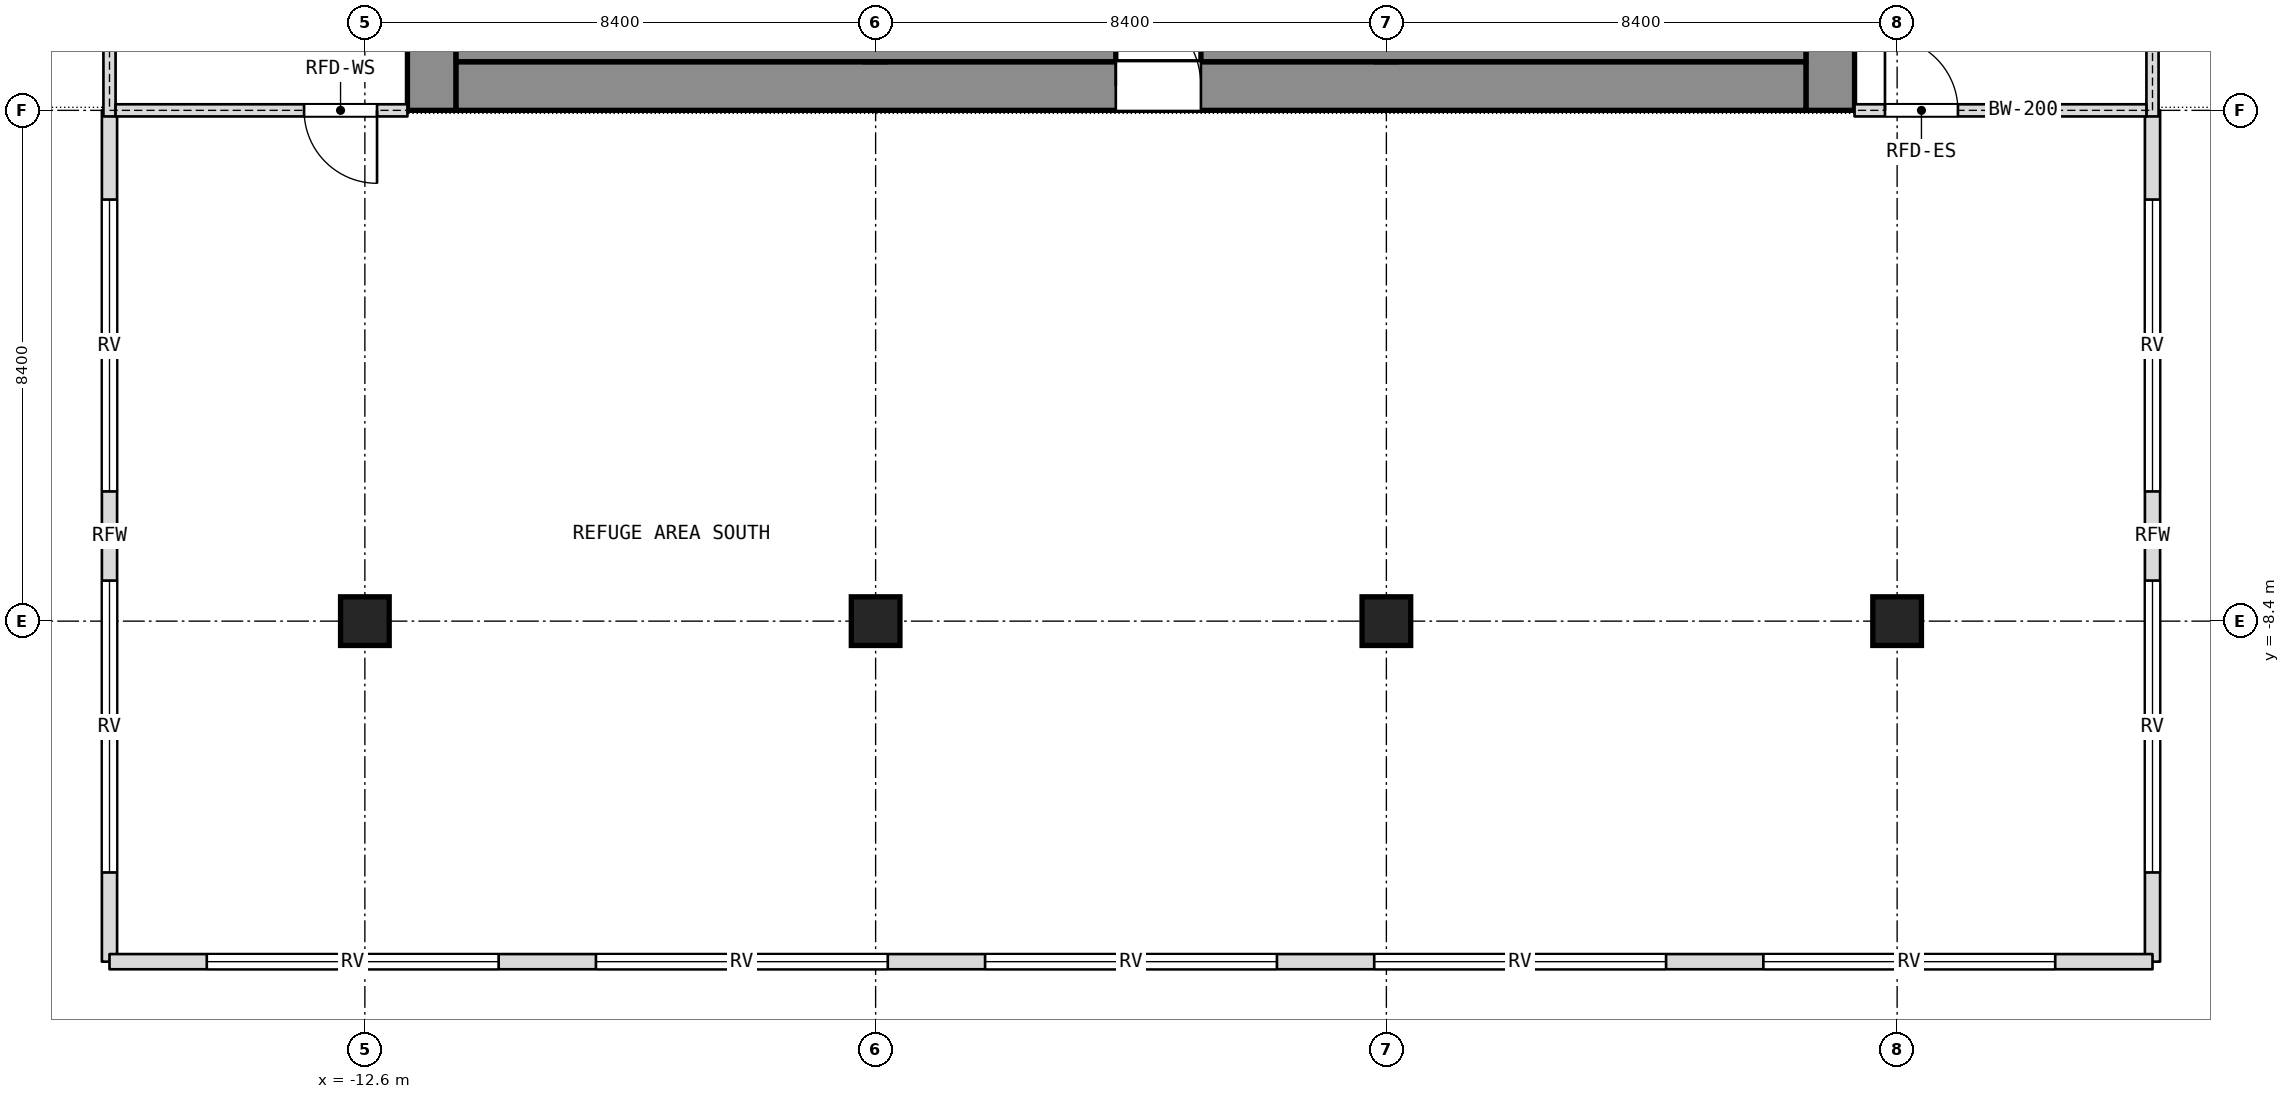
"""IFC4 building model, lengths in metres.
Left out: names, types, materials, properties, quantities, classifications, styles, units other than length and angle.
Written with IfcOpenShell. Run it as: python <this file> out.ifc"""

import sys

from ifc_helpers import new_model, si_unit, direction, frame, frame_2d, origin, origin_2d, place, context, subcontext, project, spatial, rectangle, extrude, element, fill, save


model = new_model("IFC4")
c1 = context("Model", 3, precision=1e-05, world=origin(), true_north=direction((0.0, 1.0)))
c2 = subcontext(c1, "Body", "Model", "MODEL_VIEW")
j1 = project(units=[si_unit("LENGTHUNIT", "METRE"), si_unit("PLANEANGLEUNIT", "RADIAN")], contexts=[c1])
p1 = place(None, origin())
s1 = spatial("IfcSite", under=j1, at=p1, CompositionType="ELEMENT")
p2 = place(p1, origin())
s2 = spatial("IfcBuilding", under=s1, at=p2, CompositionType="ELEMENT")
p3 = place(p2, frame((0.0, 0.0, 252.5)))
s3 = spatial("IfcBuildingStorey", under=s2, at=p3, CompositionType="ELEMENT", Elevation=252.5)
p4 = place(p3, frame((11.5, 0.0, 0.0), z_axis=(0.0, 0.0, 1.0), x_axis=(0.0, 1.0, 0.0)))
e1 = element("IfcWall", 1, at=p4, inside=s3, PredefinedType="SHEAR", context=c2, shape_type="SweptSolid", body=[
    extrude(rectangle(XDim=16.8, YDim=0.8, at=frame_2d((8.4, 0.0))), origin(), (0.0, 0.0, 1.0), 14.4),
])
p5 = place(p4, frame((6.825, 0.0, 0.0)))
e2 = element("IfcOpeningElement", 2, at=p5, cuts=e1, PredefinedType="OPENING", context=c2, shape_type="SweptSolid", body=[
    extrude(rectangle(XDim=1.2, YDim=2.1, at=frame_2d((0.6, 1.05))), frame((0.0, 0.4, 0.0), z_axis=(0.0, -1.0, 0.0), x_axis=(1.0, 0.0, 0.0)), (0.0, 0.0, 1.0), 0.8),
])
p6 = place(p4, frame((8.775, 0.0, 0.0)))
e3 = element("IfcOpeningElement", 3, at=p6, cuts=e1, PredefinedType="OPENING", context=c2, shape_type="SweptSolid", body=[
    extrude(rectangle(XDim=1.2, YDim=2.1, at=frame_2d((0.6, 1.05))), frame((0.0, 0.4, 0.0), z_axis=(0.0, -1.0, 0.0), x_axis=(1.0, 0.0, 0.0)), (0.0, 0.0, 1.0), 0.8),
])
p7 = place(p3, frame((-11.5, 0.0, 0.0), z_axis=(0.0, 0.0, 1.0), x_axis=(0.0, 1.0, 0.0)))
e4 = element("IfcWall", 4, at=p7, inside=s3, PredefinedType="SHEAR", context=c2, shape_type="SweptSolid", body=[
    extrude(rectangle(XDim=16.8, YDim=0.8, at=frame_2d((8.4, 0.0))), origin(), (0.0, 0.0, 1.0), 14.4),
])
p8 = place(p7, frame((3.6, 0.0, 0.0)))
e5 = element("IfcOpeningElement", 5, at=p8, cuts=e4, PredefinedType="OPENING", context=c2, shape_type="SweptSolid", body=[
    extrude(rectangle(XDim=0.9, YDim=2.1, at=frame_2d((0.45, 1.05))), frame((0.0, 0.4, 0.0), z_axis=(0.0, -1.0, 0.0), x_axis=(1.0, 0.0, 0.0)), (0.0, 0.0, 1.0), 0.8),
])
p9 = place(p7, frame((6.825, 0.0, 0.0)))
e6 = element("IfcOpeningElement", 6, at=p9, cuts=e4, PredefinedType="OPENING", context=c2, shape_type="SweptSolid", body=[
    extrude(rectangle(XDim=1.2, YDim=2.1, at=frame_2d((0.6, 1.05))), frame((0.0, 0.4, 0.0), z_axis=(0.0, -1.0, 0.0), x_axis=(1.0, 0.0, 0.0)), (0.0, 0.0, 1.0), 0.8),
])
p10 = place(p7, frame((12.3, 0.0, 0.0)))
e7 = element("IfcOpeningElement", 7, at=p10, cuts=e4, PredefinedType="OPENING", context=c2, shape_type="SweptSolid", body=[
    extrude(rectangle(XDim=0.9, YDim=2.1, at=frame_2d((0.45, 1.05))), frame((0.0, 0.4, 0.0), z_axis=(0.0, -1.0, 0.0), x_axis=(1.0, 0.0, 0.0)), (0.0, 0.0, 1.0), 0.8),
])
p11 = place(p7, frame((8.775, 0.0, 0.0)))
e8 = element("IfcOpeningElement", 8, at=p11, cuts=e4, PredefinedType="OPENING", context=c2, shape_type="SweptSolid", body=[
    extrude(rectangle(XDim=1.2, YDim=2.1, at=frame_2d((0.6, 1.05))), frame((0.0, 0.4, 0.0), z_axis=(0.0, -1.0, 0.0), x_axis=(1.0, 0.0, 0.0)), (0.0, 0.0, 1.0), 0.8),
])
p12 = place(p3, frame((-11.1, 0.4, 0.0), z_axis=(0.0, 0.0, 1.0), x_axis=(1.0, 0.0, 0.0)))
e9 = element("IfcWall", 9, at=p12, inside=s3, PredefinedType="SHEAR", context=c2, shape_type="SweptSolid", body=[
    extrude(rectangle(XDim=22.2, YDim=0.8, at=frame_2d((11.1, 0.0))), origin(), (0.0, 0.0, 1.0), 14.4),
])
p13 = place(p12, frame((10.85, 0.0, 0.0)))
e10 = element("IfcOpeningElement", 10, at=p13, cuts=e9, PredefinedType="OPENING", context=c2, shape_type="SweptSolid", body=[
    extrude(rectangle(XDim=1.4, YDim=2.1, at=frame_2d((0.7, 1.05))), frame((0.0, 0.4, 0.0), z_axis=(0.0, -1.0, 0.0), x_axis=(1.0, 0.0, 0.0)), (0.0, 0.0, 1.0), 0.8),
])
p14 = place(p3, frame((-4.2, 0.8, 0.0), z_axis=(0.0, 0.0, 1.0), x_axis=(0.0, 1.0, 0.0)))
e11 = element("IfcWall", 11, at=p14, inside=s3, PredefinedType="SHEAR", context=c2, shape_type="SweptSolid", body=[
    extrude(rectangle(XDim=15.2, YDim=0.4, at=frame_2d((7.6, 0.0))), origin(), (0.0, 0.0, 1.0), 14.4),
])
p15 = place(p14, frame((8.5, 0.0, 0.0)))
e12 = element("IfcOpeningElement", 12, at=p15, cuts=e11, PredefinedType="OPENING", context=c2, shape_type="SweptSolid", body=[
    extrude(rectangle(XDim=1.2, YDim=2.1, at=frame_2d((0.6, 1.05))), frame((0.0, 0.2, 0.0), z_axis=(0.0, -1.0, 0.0), x_axis=(1.0, 0.0, 0.0)), (0.0, 0.0, 1.0), 0.4),
])
p16 = place(p3, frame((4.2, 0.8, 0.0), z_axis=(0.0, 0.0, 1.0), x_axis=(0.0, 1.0, 0.0)))
e13 = element("IfcWall", 13, at=p16, inside=s3, PredefinedType="SHEAR", context=c2, shape_type="SweptSolid", body=[
    extrude(rectangle(XDim=15.2, YDim=0.4, at=frame_2d((7.6, 0.0))), origin(), (0.0, 0.0, 1.0), 14.4),
])
p17 = place(p16, frame((5.95, 0.0, 0.0)))
e14 = element("IfcOpeningElement", 14, at=p17, cuts=e13, PredefinedType="OPENING", context=c2, shape_type="SweptSolid", body=[
    extrude(rectangle(XDim=1.2, YDim=2.1, at=frame_2d((0.6, 1.05))), frame((0.0, 0.2, 0.0), z_axis=(0.0, -1.0, 0.0), x_axis=(1.0, 0.0, 0.0)), (0.0, 0.0, 1.0), 0.4),
])
for number, where, z_axis, x_axis in (
    (15, (-12.6, -8.4, 0.0), (0.0, 0.0, 1.0), (1.0, 0.0, 0.0)),
    (16, (-4.2, -8.4, 0.0), (0.0, 0.0, 1.0), (1.0, 0.0, 0.0)),
    (17, (4.2, -8.4, 0.0), (0.0, 0.0, 1.0), (1.0, 0.0, 0.0)),
    (18, (12.6, -8.4, 0.0), (0.0, 0.0, 1.0), (1.0, 0.0, 0.0)),
):
    element("IfcColumn", number, at=place(p3, frame(where, z_axis=z_axis, x_axis=x_axis)), inside=s3, PredefinedType="COLUMN", context=c2, shape_type="SweptSolid", body=[
        extrude(rectangle(XDim=0.8, YDim=0.8, at=origin_2d()), origin(), (0.0, 0.0, 1.0), 14.4),
    ])
p18 = place(p3, frame((-16.8, -14.0, 0.0), z_axis=(0.0, 0.0, 1.0), x_axis=(0.0, 1.0, 0.0)))
e19 = element("IfcWall", 19, at=p18, inside=s3, PredefinedType="SOLIDWALL", context=c2, shape_type="SweptSolid", body=[
    extrude(rectangle(XDim=14.0, YDim=0.25, at=frame_2d((7.0, 0.0))), origin(), (0.0, 0.0, 1.0), 14.14),
])
p19 = place(p18, frame((1.467, 0.0, 1.0)))
e20 = element("IfcOpeningElement", 20, at=p19, cuts=e19, PredefinedType="OPENING", context=c2, shape_type="SweptSolid", body=[
    extrude(rectangle(XDim=4.8, YDim=3.0, at=frame_2d((2.4, 1.5))), frame((0.0, 0.125, 0.0), z_axis=(0.0, -1.0, 0.0), x_axis=(1.0, 0.0, 0.0)), (0.0, 0.0, 1.0), 0.25),
])
p20 = place(p18, frame((7.733, 0.0, 1.0)))
e21 = element("IfcOpeningElement", 21, at=p20, cuts=e19, PredefinedType="OPENING", context=c2, shape_type="SweptSolid", body=[
    extrude(rectangle(XDim=4.8, YDim=3.0, at=frame_2d((2.4, 1.5))), frame((0.0, 0.125, 0.0), z_axis=(0.0, -1.0, 0.0), x_axis=(1.0, 0.0, 0.0)), (0.0, 0.0, 1.0), 0.25),
])
p21 = place(p3, frame((16.8, 0.0, 0.0), z_axis=(0.0, 0.0, 1.0), x_axis=(0.0, -1.0, 0.0)))
e22 = element("IfcWall", 22, at=p21, inside=s3, PredefinedType="SOLIDWALL", context=c2, shape_type="SweptSolid", body=[
    extrude(rectangle(XDim=14.0, YDim=0.25, at=frame_2d((7.0, 0.0))), origin(), (0.0, 0.0, 1.0), 14.14),
])
p22 = place(p21, frame((1.467, 0.0, 1.0)))
e23 = element("IfcOpeningElement", 23, at=p22, cuts=e22, PredefinedType="OPENING", context=c2, shape_type="SweptSolid", body=[
    extrude(rectangle(XDim=4.8, YDim=3.0, at=frame_2d((2.4, 1.5))), frame((0.0, 0.125, 0.0), z_axis=(0.0, -1.0, 0.0), x_axis=(1.0, 0.0, 0.0)), (0.0, 0.0, 1.0), 0.25),
])
p23 = place(p21, frame((7.733, 0.0, 1.0)))
e24 = element("IfcOpeningElement", 24, at=p23, cuts=e22, PredefinedType="OPENING", context=c2, shape_type="SweptSolid", body=[
    extrude(rectangle(XDim=4.8, YDim=3.0, at=frame_2d((2.4, 1.5))), frame((0.0, 0.125, 0.0), z_axis=(0.0, -1.0, 0.0), x_axis=(1.0, 0.0, 0.0)), (0.0, 0.0, 1.0), 0.25),
])
p24 = place(p3, frame((16.8, -14.0, 0.0), z_axis=(0.0, 0.0, 1.0), x_axis=(-1.0, 0.0, 0.0)))
e25 = element("IfcWall", 25, at=p24, inside=s3, PredefinedType="SOLIDWALL", context=c2, shape_type="SweptSolid", body=[
    extrude(rectangle(XDim=33.6, YDim=0.25, at=frame_2d((16.8, 0.0))), origin(), (0.0, 0.0, 1.0), 14.14),
])
p25 = place(p24, frame((1.6, 0.0, 1.0)))
e26 = element("IfcOpeningElement", 26, at=p25, cuts=e25, PredefinedType="OPENING", context=c2, shape_type="SweptSolid", body=[
    extrude(rectangle(XDim=4.8, YDim=3.0, at=frame_2d((2.4, 1.5))), frame((0.0, 0.125, 0.0), z_axis=(0.0, -1.0, 0.0), x_axis=(1.0, 0.0, 0.0)), (0.0, 0.0, 1.0), 0.25),
])
p26 = place(p24, frame((8.0, 0.0, 1.0)))
e27 = element("IfcOpeningElement", 27, at=p26, cuts=e25, PredefinedType="OPENING", context=c2, shape_type="SweptSolid", body=[
    extrude(rectangle(XDim=4.8, YDim=3.0, at=frame_2d((2.4, 1.5))), frame((0.0, 0.125, 0.0), z_axis=(0.0, -1.0, 0.0), x_axis=(1.0, 0.0, 0.0)), (0.0, 0.0, 1.0), 0.25),
])
p27 = place(p24, frame((14.4, 0.0, 1.0)))
e28 = element("IfcOpeningElement", 28, at=p27, cuts=e25, PredefinedType="OPENING", context=c2, shape_type="SweptSolid", body=[
    extrude(rectangle(XDim=4.8, YDim=3.0, at=frame_2d((2.4, 1.5))), frame((0.0, 0.125, 0.0), z_axis=(0.0, -1.0, 0.0), x_axis=(1.0, 0.0, 0.0)), (0.0, 0.0, 1.0), 0.25),
])
p28 = place(p24, frame((20.8, 0.0, 1.0)))
e29 = element("IfcOpeningElement", 29, at=p28, cuts=e25, PredefinedType="OPENING", context=c2, shape_type="SweptSolid", body=[
    extrude(rectangle(XDim=4.8, YDim=3.0, at=frame_2d((2.4, 1.5))), frame((0.0, 0.125, 0.0), z_axis=(0.0, -1.0, 0.0), x_axis=(1.0, 0.0, 0.0)), (0.0, 0.0, 1.0), 0.25),
])
p29 = place(p24, frame((27.2, 0.0, 1.0)))
e30 = element("IfcOpeningElement", 30, at=p29, cuts=e25, PredefinedType="OPENING", context=c2, shape_type="SweptSolid", body=[
    extrude(rectangle(XDim=4.8, YDim=3.0, at=frame_2d((2.4, 1.5))), frame((0.0, 0.125, 0.0), z_axis=(0.0, -1.0, 0.0), x_axis=(1.0, 0.0, 0.0)), (0.0, 0.0, 1.0), 0.25),
])
p30 = place(p3, frame((-11.1, 1.15, 0.0), z_axis=(0.0, 0.0, 1.0), x_axis=(1.0, 0.0, 0.0)))
e31 = element("IfcWall", 31, at=p30, inside=s3, PredefinedType="PARTITIONING", context=c2, shape_type="SweptSolid", body=[
    extrude(rectangle(XDim=10.85, YDim=0.7, at=frame_2d((5.425, 0.0))), origin(), (0.0, 0.0, 1.0), 14.14),
])
p31 = place(p3, frame((1.15, 1.15, 0.0), z_axis=(0.0, 0.0, 1.0), x_axis=(1.0, 0.0, 0.0)))
e32 = element("IfcWall", 32, at=p31, inside=s3, PredefinedType="PARTITIONING", context=c2, shape_type="SweptSolid", body=[
    extrude(rectangle(XDim=9.95, YDim=0.7, at=frame_2d((4.975, 0.0))), origin(), (0.0, 0.0, 1.0), 14.14),
])
p32 = place(p3, frame((-16.8, -0.1, 0.0), z_axis=(0.0, 0.0, 1.0), x_axis=(0.0, 1.0, 0.0)))
e33 = element("IfcWall", 33, at=p32, inside=s3, PredefinedType="PARTITIONING", context=c2, shape_type="SweptSolid", body=[
    extrude(rectangle(XDim=17.0, YDim=0.2, at=frame_2d((8.5, 0.0))), origin(), (0.0, 0.0, 1.0), 13.74),
])
p33 = place(p32, frame((2.2, 0.0, 0.0)))
e34 = element("IfcOpeningElement", 34, at=p33, cuts=e33, PredefinedType="OPENING", context=c2, shape_type="SweptSolid", body=[
    extrude(rectangle(XDim=1.8, YDim=2.1, at=frame_2d((0.9, 1.05))), frame((0.0, 0.1, 0.0), z_axis=(0.0, -1.0, 0.0), x_axis=(1.0, 0.0, 0.0)), (0.0, 0.0, 1.0), 0.2),
])
p34 = place(p32, frame((13.0, 0.0, 0.0)))
e35 = element("IfcOpeningElement", 35, at=p34, cuts=e33, PredefinedType="OPENING", context=c2, shape_type="SweptSolid", body=[
    extrude(rectangle(XDim=1.8, YDim=2.1, at=frame_2d((0.9, 1.05))), frame((0.0, 0.1, 0.0), z_axis=(0.0, -1.0, 0.0), x_axis=(1.0, 0.0, 0.0)), (0.0, 0.0, 1.0), 0.2),
])
p35 = place(p3, frame((-16.7, 0.0, 0.0), z_axis=(0.0, 0.0, 1.0), x_axis=(1.0, 0.0, 0.0)))
e36 = element("IfcWall", 36, at=p35, inside=s3, PredefinedType="PARTITIONING", context=c2, shape_type="SweptSolid", body=[
    extrude(rectangle(XDim=4.8, YDim=0.2, at=frame_2d((2.4, 0.0))), origin(), (0.0, 0.0, 1.0), 13.8),
])
p36 = place(p35, frame((3.1, 0.0, 0.0)))
e37 = element("IfcOpeningElement", 37, at=p36, cuts=e36, PredefinedType="OPENING", context=c2, shape_type="SweptSolid", body=[
    extrude(rectangle(XDim=1.2, YDim=2.1, at=frame_2d((0.6, 1.05))), frame((0.0, 0.1, 0.0), z_axis=(0.0, -1.0, 0.0), x_axis=(1.0, 0.0, 0.0)), (0.0, 0.0, 1.0), 0.2),
])
p37 = place(p3, frame((16.8, -0.1, 0.0), z_axis=(0.0, 0.0, 1.0), x_axis=(0.0, 1.0, 0.0)))
e38 = element("IfcWall", 38, at=p37, inside=s3, PredefinedType="PARTITIONING", context=c2, shape_type="SweptSolid", body=[
    extrude(rectangle(XDim=17.0, YDim=0.2, at=frame_2d((8.5, 0.0))), origin(), (0.0, 0.0, 1.0), 13.74),
])
p38 = place(p37, frame((2.2, 0.0, 0.0)))
e39 = element("IfcOpeningElement", 39, at=p38, cuts=e38, PredefinedType="OPENING", context=c2, shape_type="SweptSolid", body=[
    extrude(rectangle(XDim=1.8, YDim=2.1, at=frame_2d((0.9, 1.05))), frame((0.0, 0.1, 0.0), z_axis=(0.0, -1.0, 0.0), x_axis=(1.0, 0.0, 0.0)), (0.0, 0.0, 1.0), 0.2),
])
p39 = place(p37, frame((13.0, 0.0, 0.0)))
e40 = element("IfcOpeningElement", 40, at=p39, cuts=e38, PredefinedType="OPENING", context=c2, shape_type="SweptSolid", body=[
    extrude(rectangle(XDim=1.8, YDim=2.1, at=frame_2d((0.9, 1.05))), frame((0.0, 0.1, 0.0), z_axis=(0.0, -1.0, 0.0), x_axis=(1.0, 0.0, 0.0)), (0.0, 0.0, 1.0), 0.2),
])
p40 = place(p3, frame((11.9, 0.0, 0.0), z_axis=(0.0, 0.0, 1.0), x_axis=(1.0, 0.0, 0.0)))
e41 = element("IfcWall", 41, at=p40, inside=s3, PredefinedType="PARTITIONING", context=c2, shape_type="SweptSolid", body=[
    extrude(rectangle(XDim=4.8, YDim=0.2, at=frame_2d((2.4, 0.0))), origin(), (0.0, 0.0, 1.0), 13.8),
])
p41 = place(p40, frame((0.5, 0.0, 0.0)))
e42 = element("IfcOpeningElement", 42, at=p41, cuts=e41, PredefinedType="OPENING", context=c2, shape_type="SweptSolid", body=[
    extrude(rectangle(XDim=1.2, YDim=2.1, at=frame_2d((0.6, 1.05))), frame((0.0, 0.1, 0.0), z_axis=(0.0, -1.0, 0.0), x_axis=(1.0, 0.0, 0.0)), (0.0, 0.0, 1.0), 0.2),
])
p42 = place(p19, origin())
e43 = element("IfcWindow", 43, at=p42, inside=s3, PartitioningType="SINGLE_PANEL", PredefinedType="WINDOW", context=c2, shape_type="SweptSolid", body=[
    extrude(rectangle(XDim=4.8, YDim=3.0, at=frame_2d((2.4, 1.5))), frame((0.0, 0.03, 0.0), z_axis=(0.0, -1.0, 0.0), x_axis=(1.0, 0.0, 0.0)), (0.0, 0.0, 1.0), 0.06),
])
fill(e20, e43)
p43 = place(p20, origin())
e44 = element("IfcWindow", 44, at=p43, inside=s3, PartitioningType="SINGLE_PANEL", PredefinedType="WINDOW", context=c2, shape_type="SweptSolid", body=[
    extrude(rectangle(XDim=4.8, YDim=3.0, at=frame_2d((2.4, 1.5))), frame((0.0, 0.03, 0.0), z_axis=(0.0, -1.0, 0.0), x_axis=(1.0, 0.0, 0.0)), (0.0, 0.0, 1.0), 0.06),
])
fill(e21, e44)
p44 = place(p22, origin())
e45 = element("IfcWindow", 45, at=p44, inside=s3, PartitioningType="SINGLE_PANEL", PredefinedType="WINDOW", context=c2, shape_type="SweptSolid", body=[
    extrude(rectangle(XDim=4.8, YDim=3.0, at=frame_2d((2.4, 1.5))), frame((0.0, 0.03, 0.0), z_axis=(0.0, -1.0, 0.0), x_axis=(1.0, 0.0, 0.0)), (0.0, 0.0, 1.0), 0.06),
])
fill(e23, e45)
p45 = place(p23, origin())
e46 = element("IfcWindow", 46, at=p45, inside=s3, PartitioningType="SINGLE_PANEL", PredefinedType="WINDOW", context=c2, shape_type="SweptSolid", body=[
    extrude(rectangle(XDim=4.8, YDim=3.0, at=frame_2d((2.4, 1.5))), frame((0.0, 0.03, 0.0), z_axis=(0.0, -1.0, 0.0), x_axis=(1.0, 0.0, 0.0)), (0.0, 0.0, 1.0), 0.06),
])
fill(e24, e46)
p46 = place(p25, origin())
e47 = element("IfcWindow", 47, at=p46, inside=s3, PartitioningType="SINGLE_PANEL", PredefinedType="WINDOW", context=c2, shape_type="SweptSolid", body=[
    extrude(rectangle(XDim=4.8, YDim=3.0, at=frame_2d((2.4, 1.5))), frame((0.0, 0.03, 0.0), z_axis=(0.0, -1.0, 0.0), x_axis=(1.0, 0.0, 0.0)), (0.0, 0.0, 1.0), 0.06),
])
fill(e26, e47)
p47 = place(p26, origin())
e48 = element("IfcWindow", 48, at=p47, inside=s3, PartitioningType="SINGLE_PANEL", PredefinedType="WINDOW", context=c2, shape_type="SweptSolid", body=[
    extrude(rectangle(XDim=4.8, YDim=3.0, at=frame_2d((2.4, 1.5))), frame((0.0, 0.03, 0.0), z_axis=(0.0, -1.0, 0.0), x_axis=(1.0, 0.0, 0.0)), (0.0, 0.0, 1.0), 0.06),
])
fill(e27, e48)
p48 = place(p27, origin())
e49 = element("IfcWindow", 49, at=p48, inside=s3, PartitioningType="SINGLE_PANEL", PredefinedType="WINDOW", context=c2, shape_type="SweptSolid", body=[
    extrude(rectangle(XDim=4.8, YDim=3.0, at=frame_2d((2.4, 1.5))), frame((0.0, 0.03, 0.0), z_axis=(0.0, -1.0, 0.0), x_axis=(1.0, 0.0, 0.0)), (0.0, 0.0, 1.0), 0.06),
])
fill(e28, e49)
p49 = place(p28, origin())
e50 = element("IfcWindow", 50, at=p49, inside=s3, PartitioningType="SINGLE_PANEL", PredefinedType="WINDOW", context=c2, shape_type="SweptSolid", body=[
    extrude(rectangle(XDim=4.8, YDim=3.0, at=frame_2d((2.4, 1.5))), frame((0.0, 0.03, 0.0), z_axis=(0.0, -1.0, 0.0), x_axis=(1.0, 0.0, 0.0)), (0.0, 0.0, 1.0), 0.06),
])
fill(e29, e50)
p50 = place(p29, origin())
e51 = element("IfcWindow", 51, at=p50, inside=s3, PartitioningType="SINGLE_PANEL", PredefinedType="WINDOW", context=c2, shape_type="SweptSolid", body=[
    extrude(rectangle(XDim=4.8, YDim=3.0, at=frame_2d((2.4, 1.5))), frame((0.0, 0.03, 0.0), z_axis=(0.0, -1.0, 0.0), x_axis=(1.0, 0.0, 0.0)), (0.0, 0.0, 1.0), 0.06),
])
fill(e30, e51)
p51 = place(p13, origin())
e52 = element("IfcDoor", 52, at=p51, inside=s3, OperationType="SINGLE_SWING_LEFT", PredefinedType="DOOR", context=c2, shape_type="SweptSolid", body=[
    extrude(rectangle(XDim=1.4, YDim=2.1, at=frame_2d((0.7, 1.05))), frame((0.0, 0.025, 0.0), z_axis=(0.0, -1.0, 0.0), x_axis=(1.0, 0.0, 0.0)), (0.0, 0.0, 1.0), 0.05),
])
fill(e10, e52)
p52 = place(p36, origin())
e53 = element("IfcDoor", 53, at=p52, inside=s3, OperationType="SINGLE_SWING_LEFT", PredefinedType="DOOR", context=c2, shape_type="SweptSolid", body=[
    extrude(rectangle(XDim=1.2, YDim=2.1, at=frame_2d((0.6, 1.05))), frame((0.0, 0.025, 0.0), z_axis=(0.0, -1.0, 0.0), x_axis=(1.0, 0.0, 0.0)), (0.0, 0.0, 1.0), 0.05),
])
fill(e37, e53)
p53 = place(p41, origin())
e54 = element("IfcDoor", 54, at=p53, inside=s3, OperationType="SINGLE_SWING_LEFT", PredefinedType="DOOR", context=c2, shape_type="SweptSolid", body=[
    extrude(rectangle(XDim=1.2, YDim=2.1, at=frame_2d((0.6, 1.05))), frame((0.0, 0.025, 0.0), z_axis=(0.0, -1.0, 0.0), x_axis=(1.0, 0.0, 0.0)), (0.0, 0.0, 1.0), 0.05),
])
fill(e42, e54)
save(model, sys.argv[1])
